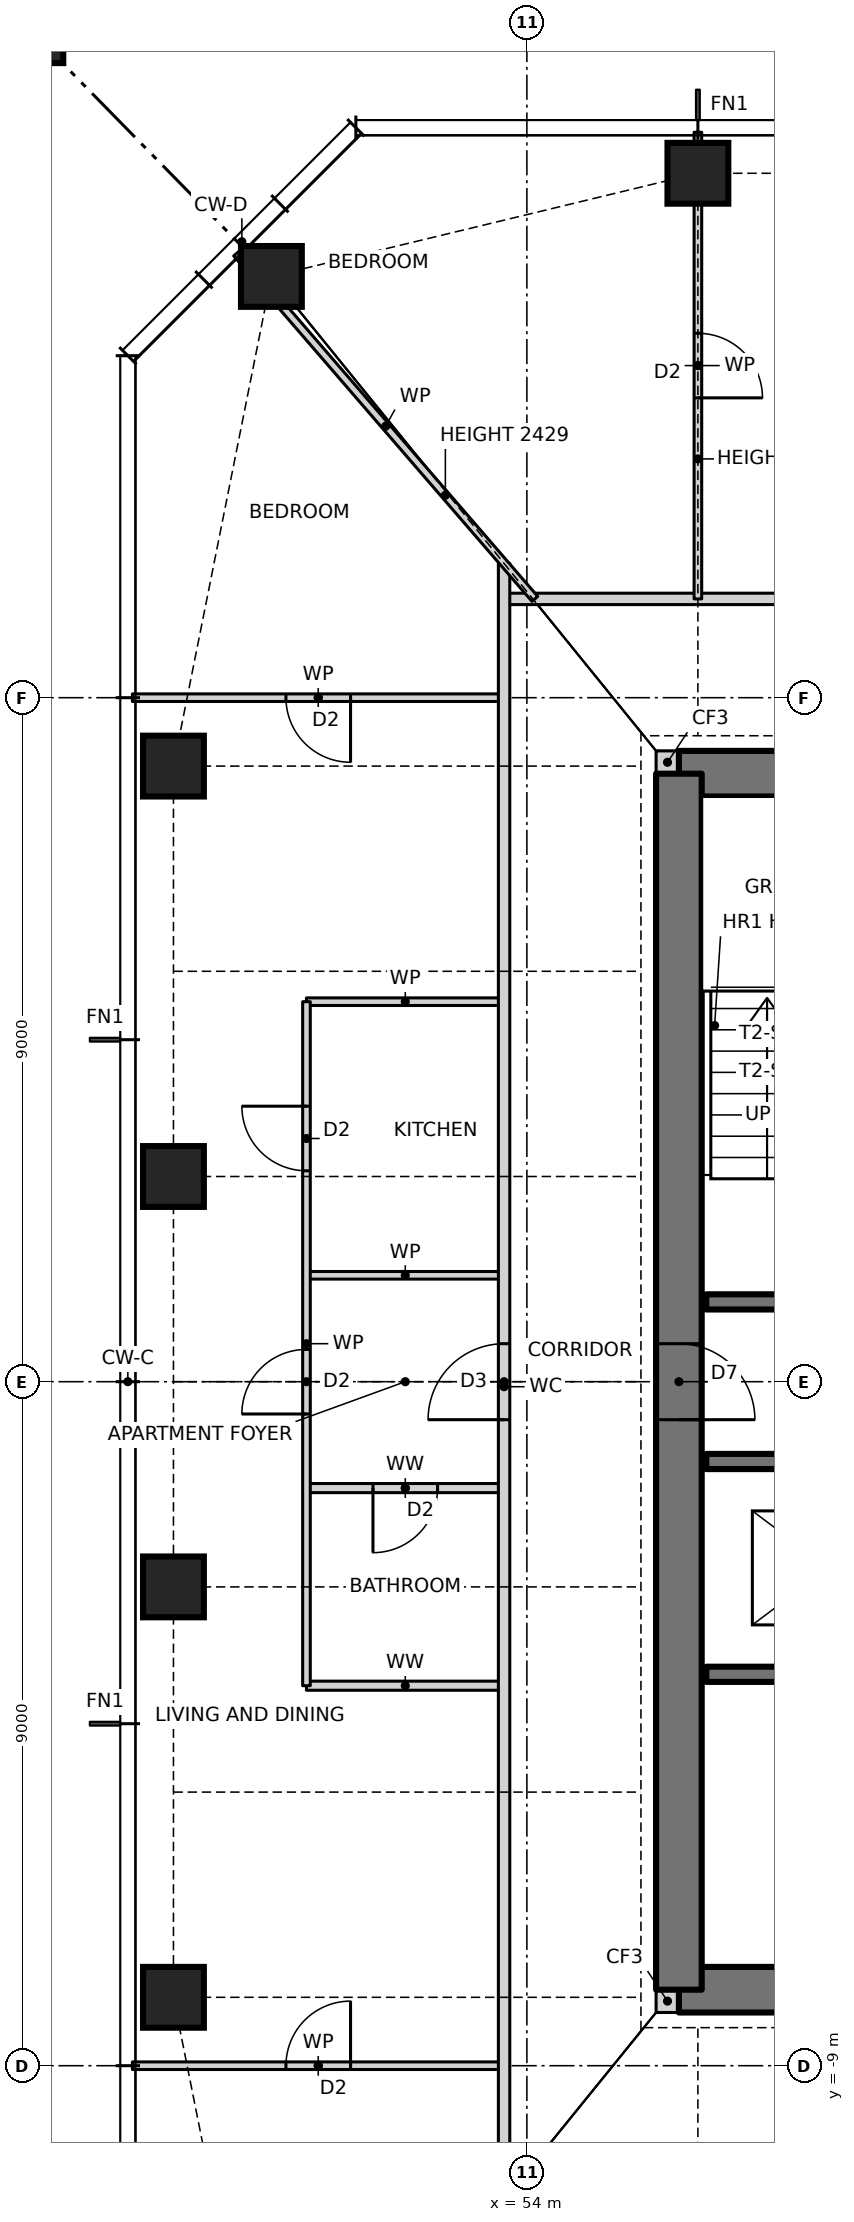
"""IFC4 building model, lengths in metres.
Left out: names, types, materials, properties, quantities, classifications, styles, units other than length and angle.
Written with IfcOpenShell. Run it as: python <this file> out.ifc"""

import sys

from ifc_helpers import new_model, si_unit, direction, frame, frame_2d, origin, origin_2d, place, context, subcontext, project, spatial, rectangle, hollow_rectangle, extrude, element, fill, save


model = new_model("IFC4")
c1 = context("Model", 3, precision=1e-05, world=origin(), true_north=direction((0.0, 1.0)))
c2 = subcontext(c1, "Body", "Model", "MODEL_VIEW")
j1 = project(units=[si_unit("LENGTHUNIT", "METRE"), si_unit("PLANEANGLEUNIT", "RADIAN")], contexts=[c1])
p1 = place(None, origin())
s1 = spatial("IfcSite", under=j1, at=p1, CompositionType="ELEMENT")
p2 = place(p1, origin())
s2 = spatial("IfcBuilding", under=s1, at=p2, CompositionType="ELEMENT")
p3 = place(p2, frame((0.0, 0.0, 122.5)))
s3 = spatial("IfcBuildingStorey", under=s2, at=p3, CompositionType="ELEMENT", Elevation=122.5)
for number, where, z_axis, x_axis in (
    (1, (56.25, 15.9, 0.0), (0.0, 0.0, 1.0), (1.0, 0.0, 0.0)),
    (2, (50.639, 14.543, 0.0), (0.0, 0.0, 1.0), (1.0, 0.0, 0.0)),
    (3, (49.35, 8.1, 0.0), (0.0, 0.0, 1.0), (1.0, 0.0, 0.0)),
    (4, (49.35, 2.7, 0.0), (0.0, 0.0, 1.0), (1.0, 0.0, 0.0)),
    (5, (49.35, -2.7, 0.0), (0.0, 0.0, 1.0), (1.0, 0.0, 0.0)),
    (6, (49.35, -8.1, 0.0), (0.0, 0.0, 1.0), (1.0, 0.0, 0.0)),
):
    element("IfcColumn", number, at=place(p3, frame(where, z_axis=z_axis, x_axis=x_axis)), inside=s3, PredefinedType="COLUMN", context=c2, shape_type="SweptSolid", body=[
        extrude(hollow_rectangle(XDim=0.8, YDim=0.8, WallThickness=0.1, at=origin_2d()), origin(), (0.0, 0.0, 1.0), 3.5),
    ])
p4 = place(p3, frame((47.35, 17.9, 0.0), z_axis=(0.0, 0.0, 1.0), x_axis=(1.0, 0.0, 0.0)))
e7 = element("IfcColumn", 7, at=p4, inside=s3, PredefinedType="COLUMN", context=c2, shape_type="SweptSolid", body=[
    extrude(hollow_rectangle(XDim=1.1, YDim=1.1, WallThickness=0.06, at=origin_2d()), origin(), (0.0, 0.0, 1.0), 3.5),
])
for number, where, z_axis, x_axis in (
    (8, (55.7, -8.15, 0.0), (0.0, 0.0, 1.0), (1.0, 0.0, 0.0)),
    (9, (55.7, 8.15, 0.0), (0.0, 0.0, 1.0), (1.0, 0.0, 0.0)),
):
    element("IfcWall", number, at=place(p3, frame(where, z_axis=z_axis, x_axis=x_axis)), inside=s3, PredefinedType="SOLIDWALL", context=c2, shape_type="SweptSolid", body=[
        extrude(rectangle(XDim=0.3, YDim=0.3, at=frame_2d((0.15, 0.0))), origin(), (0.0, 0.0, 1.0), 3.5),
    ])
p5 = place(p3, frame((56.0, -8.0, 0.0), z_axis=(0.0, 0.0, 1.0), x_axis=(1.0, 0.0, 0.0)))
e10 = element("IfcWall", 10, at=p5, inside=s3, PredefinedType="SHEAR", context=c2, shape_type="SweptSolid", body=[
    extrude(rectangle(XDim=14.0, YDim=0.6, at=frame_2d((7.0, 0.0))), origin(), (0.0, 0.0, 1.0), 3.5),
])
p6 = place(p5, frame((2.7, 0.0, 0.0)))
e11 = element("IfcOpeningElement", 11, at=p6, cuts=e10, PredefinedType="OPENING", context=c2, shape_type="SweptSolid", body=[
    extrude(rectangle(XDim=0.9, YDim=2.1, at=frame_2d((0.45, 1.05))), frame((0.0, 0.31, 0.0), z_axis=(0.0, -1.0, 0.0), x_axis=(1.0, 0.0, 0.0)), (0.0, 0.0, 1.0), 0.62),
])
p7 = place(p5, frame((7.7, 0.0, 0.0)))
e12 = element("IfcOpeningElement", 12, at=p7, cuts=e10, PredefinedType="OPENING", context=c2, shape_type="SweptSolid", body=[
    extrude(rectangle(XDim=0.9, YDim=2.1, at=frame_2d((0.45, 1.05))), frame((0.0, 0.31, 0.0), z_axis=(0.0, -1.0, 0.0), x_axis=(1.0, 0.0, 0.0)), (0.0, 0.0, 1.0), 0.62),
])
p8 = place(p3, frame((70.0, 8.0, 0.0), z_axis=(0.0, 0.0, 1.0), x_axis=(-1.0, 0.0, 0.0)))
e13 = element("IfcWall", 13, at=p8, inside=s3, PredefinedType="SHEAR", context=c2, shape_type="SweptSolid", body=[
    extrude(rectangle(XDim=14.0, YDim=0.6, at=frame_2d((7.0, 0.0))), origin(), (0.0, 0.0, 1.0), 3.5),
])
p9 = place(p8, frame((8.2, 0.0, 0.0)))
e14 = element("IfcOpeningElement", 14, at=p9, cuts=e13, PredefinedType="OPENING", context=c2, shape_type="SweptSolid", body=[
    extrude(rectangle(XDim=0.9, YDim=2.1, at=frame_2d((0.45, 1.05))), frame((0.0, 0.31, 0.0), z_axis=(0.0, -1.0, 0.0), x_axis=(1.0, 0.0, 0.0)), (0.0, 0.0, 1.0), 0.62),
])
p10 = place(p8, frame((3.2, 0.0, 0.0)))
e15 = element("IfcOpeningElement", 15, at=p10, cuts=e13, PredefinedType="OPENING", context=c2, shape_type="SweptSolid", body=[
    extrude(rectangle(XDim=0.9, YDim=2.1, at=frame_2d((0.45, 1.05))), frame((0.0, 0.31, 0.0), z_axis=(0.0, -1.0, 0.0), x_axis=(1.0, 0.0, 0.0)), (0.0, 0.0, 1.0), 0.62),
])
p11 = place(p3, frame((56.0, 8.0, 0.0), z_axis=(0.0, 0.0, 1.0), x_axis=(0.0, -1.0, 0.0)))
e16 = element("IfcWall", 16, at=p11, inside=s3, PredefinedType="SHEAR", context=c2, shape_type="SweptSolid", body=[
    extrude(rectangle(XDim=16.0, YDim=0.6, at=frame_2d((8.0, 0.0))), origin(), (0.0, 0.0, 1.0), 3.5),
])
p12 = place(p11, frame((7.5, 0.0, 0.0)))
e17 = element("IfcOpeningElement", 17, at=p12, cuts=e16, PredefinedType="OPENING", context=c2, shape_type="SweptSolid", body=[
    extrude(rectangle(XDim=1.0, YDim=2.1, at=frame_2d((0.5, 1.05))), frame((0.0, 0.31, 0.0), z_axis=(0.0, -1.0, 0.0), x_axis=(1.0, 0.0, 0.0)), (0.0, 0.0, 1.0), 0.62),
])
p13 = place(p3, frame((48.81, -9.0, 0.0), z_axis=(0.0, 0.0, 1.0), x_axis=(1.0, 0.0, 0.0)))
e18 = element("IfcWall", 18, at=p13, inside=s3, PredefinedType="PARTITIONING", context=c2, shape_type="SweptSolid", body=[
    extrude(rectangle(XDim=4.89, YDim=0.1, at=frame_2d((2.445, 0.0))), origin(), (0.0, 0.0, 1.0), 3.27),
])
p14 = place(p13, frame((2.02, 0.0, 0.0)))
e19 = element("IfcOpeningElement", 19, at=p14, cuts=e18, PredefinedType="OPENING", context=c2, shape_type="SweptSolid", body=[
    extrude(rectangle(XDim=0.85, YDim=2.1, at=frame_2d((0.425, 1.05))), frame((0.0, 0.06, 0.0), z_axis=(0.0, -1.0, 0.0), x_axis=(1.0, 0.0, 0.0)), (0.0, 0.0, 1.0), 0.12),
])
p15 = place(p3, frame((51.1, -4.0, 0.0), z_axis=(0.0, 0.0, 1.0), x_axis=(1.0, 0.0, 0.0)))
e20 = element("IfcWall", 20, at=p15, inside=s3, PredefinedType="PARTITIONING", context=c2, shape_type="SweptSolid", body=[
    extrude(rectangle(XDim=2.6, YDim=0.12, at=frame_2d((1.3, 0.0))), origin(), (0.0, 0.0, 1.0), 3.27),
])
p16 = place(p3, frame((56.36, -3.85, 0.0), z_axis=(0.0, 0.0, 1.0), x_axis=(1.0, 0.0, 0.0)))
e21 = element("IfcWall", 21, at=p16, inside=s3, PredefinedType="SOLIDWALL", context=c2, shape_type="SweptSolid", body=[
    extrude(rectangle(XDim=9.94, YDim=0.2, at=frame_2d((4.97, 0.0))), origin(), (0.0, 0.0, 1.0), 3.5),
])
p17 = place(p3, frame((51.1, -1.4, 0.0), z_axis=(0.0, 0.0, 1.0), x_axis=(1.0, 0.0, 0.0)))
e22 = element("IfcWall", 22, at=p17, inside=s3, PredefinedType="PARTITIONING", context=c2, shape_type="SweptSolid", body=[
    extrude(rectangle(XDim=2.6, YDim=0.12, at=frame_2d((1.3, 0.0))), origin(), (0.0, 0.0, 1.0), 3.27),
])
p18 = place(p17, frame((0.875, 0.0, 0.0)))
e23 = element("IfcOpeningElement", 23, at=p18, cuts=e22, PredefinedType="OPENING", context=c2, shape_type="SweptSolid", body=[
    extrude(rectangle(XDim=0.85, YDim=2.1, at=frame_2d((0.425, 1.05))), frame((0.0, 0.07, 0.0), z_axis=(0.0, -1.0, 0.0), x_axis=(1.0, 0.0, 0.0)), (0.0, 0.0, 1.0), 0.14),
])
p19 = place(p3, frame((56.36, -1.05, 0.0), z_axis=(0.0, 0.0, 1.0), x_axis=(1.0, 0.0, 0.0)))
e24 = element("IfcWall", 24, at=p19, inside=s3, PredefinedType="SOLIDWALL", context=c2, shape_type="SweptSolid", body=[
    extrude(rectangle(XDim=13.28, YDim=0.2, at=frame_2d((6.64, 0.0))), origin(), (0.0, 0.0, 1.0), 3.5),
])
p20 = place(p19, frame((11.11, 0.0, 0.0)))
e25 = element("IfcOpeningElement", 25, at=p20, cuts=e24, PredefinedType="OPENING", context=c2, shape_type="SweptSolid", body=[
    extrude(rectangle(XDim=1.0, YDim=2.1, at=frame_2d((0.5, 1.05))), frame((0.0, 0.11, 0.0), z_axis=(0.0, -1.0, 0.0), x_axis=(1.0, 0.0, 0.0)), (0.0, 0.0, 1.0), 0.22),
])
p21 = place(p19, frame((1.087, 0.0, 0.0)))
e26 = element("IfcOpeningElement", 26, at=p21, cuts=e24, PredefinedType="OPENING", context=c2, shape_type="SweptSolid", body=[
    extrude(rectangle(XDim=1.1, YDim=2.1, at=frame_2d((0.55, 1.05))), frame((0.0, 0.11, 0.0), z_axis=(0.0, -1.0, 0.0), x_axis=(1.0, 0.0, 0.0)), (0.0, 0.0, 1.0), 0.22),
])
p22 = place(p19, frame((4.39, 0.0, 0.0)))
e27 = element("IfcOpeningElement", 27, at=p22, cuts=e24, PredefinedType="OPENING", context=c2, shape_type="SweptSolid", body=[
    extrude(rectangle(XDim=1.1, YDim=2.1, at=frame_2d((0.55, 1.05))), frame((0.0, 0.11, 0.0), z_axis=(0.0, -1.0, 0.0), x_axis=(1.0, 0.0, 0.0)), (0.0, 0.0, 1.0), 0.22),
])
p23 = place(p19, frame((7.724, 0.0, 0.0)))
e28 = element("IfcOpeningElement", 28, at=p23, cuts=e24, PredefinedType="OPENING", context=c2, shape_type="SweptSolid", body=[
    extrude(rectangle(XDim=1.1, YDim=2.1, at=frame_2d((0.55, 1.05))), frame((0.0, 0.11, 0.0), z_axis=(0.0, -1.0, 0.0), x_axis=(1.0, 0.0, 0.0)), (0.0, 0.0, 1.0), 0.22),
])
p24 = place(p3, frame((56.36, 1.05, 0.0), z_axis=(0.0, 0.0, 1.0), x_axis=(1.0, 0.0, 0.0)))
e29 = element("IfcWall", 29, at=p24, inside=s3, PredefinedType="SOLIDWALL", context=c2, shape_type="SweptSolid", body=[
    extrude(rectangle(XDim=13.28, YDim=0.2, at=frame_2d((6.64, 0.0))), origin(), (0.0, 0.0, 1.0), 3.5),
])
p25 = place(p24, frame((1.17, 0.0, 0.0)))
e30 = element("IfcOpeningElement", 30, at=p25, cuts=e29, PredefinedType="OPENING", context=c2, shape_type="SweptSolid", body=[
    extrude(rectangle(XDim=1.0, YDim=2.1, at=frame_2d((0.5, 1.05))), frame((0.0, 0.11, 0.0), z_axis=(0.0, -1.0, 0.0), x_axis=(1.0, 0.0, 0.0)), (0.0, 0.0, 1.0), 0.22),
])
p26 = place(p24, frame((5.14, 0.0, 0.0)))
e31 = element("IfcOpeningElement", 31, at=p26, cuts=e29, PredefinedType="OPENING", context=c2, shape_type="SweptSolid", body=[
    extrude(rectangle(XDim=0.9, YDim=2.1, at=frame_2d((0.45, 1.05))), frame((0.0, 0.11, 0.0), z_axis=(0.0, -1.0, 0.0), x_axis=(1.0, 0.0, 0.0)), (0.0, 0.0, 1.0), 0.22),
])
p27 = place(p24, frame((8.44, 0.0, 0.0)))
e32 = element("IfcOpeningElement", 32, at=p27, cuts=e29, PredefinedType="OPENING", context=c2, shape_type="SweptSolid", body=[
    extrude(rectangle(XDim=0.9, YDim=2.1, at=frame_2d((0.45, 1.05))), frame((0.0, 0.11, 0.0), z_axis=(0.0, -1.0, 0.0), x_axis=(1.0, 0.0, 0.0)), (0.0, 0.0, 1.0), 0.22),
])
p28 = place(p24, frame((10.96, 0.0, 0.0)))
e33 = element("IfcOpeningElement", 33, at=p28, cuts=e29, PredefinedType="OPENING", context=c2, shape_type="SweptSolid", body=[
    extrude(rectangle(XDim=1.3, YDim=2.1, at=frame_2d((0.65, 1.05))), frame((0.0, 0.11, 0.0), z_axis=(0.0, -1.0, 0.0), x_axis=(1.0, 0.0, 0.0)), (0.0, 0.0, 1.0), 0.22),
])
for number, where, z_axis, x_axis in (
    (34, (51.1, 1.4, 0.0), (0.0, 0.0, 1.0), (1.0, 0.0, 0.0)),
    (35, (51.1, 5.0, 0.0), (0.0, 0.0, 1.0), (1.0, 0.0, 0.0)),
):
    element("IfcWall", number, at=place(p3, frame(where, z_axis=z_axis, x_axis=x_axis)), inside=s3, PredefinedType="PARTITIONING", context=c2, shape_type="SweptSolid", body=[
        extrude(rectangle(XDim=2.6, YDim=0.1, at=frame_2d((1.3, 0.0))), origin(), (0.0, 0.0, 1.0), 3.27),
    ])
p29 = place(p3, frame((48.81, 9.0, 0.0), z_axis=(0.0, 0.0, 1.0), x_axis=(1.0, 0.0, 0.0)))
e36 = element("IfcWall", 36, at=p29, inside=s3, PredefinedType="PARTITIONING", context=c2, shape_type="SweptSolid", body=[
    extrude(rectangle(XDim=4.89, YDim=0.1, at=frame_2d((2.445, 0.0))), origin(), (0.0, 0.0, 1.0), 3.27),
])
p30 = place(p29, frame((2.02, 0.0, 0.0)))
e37 = element("IfcOpeningElement", 37, at=p30, cuts=e36, PredefinedType="OPENING", context=c2, shape_type="SweptSolid", body=[
    extrude(rectangle(XDim=0.85, YDim=2.1, at=frame_2d((0.425, 1.05))), frame((0.0, 0.06, 0.0), z_axis=(0.0, -1.0, 0.0), x_axis=(1.0, 0.0, 0.0)), (0.0, 0.0, 1.0), 0.12),
])
p31 = place(p3, frame((53.7, 10.3, 0.0), z_axis=(0.0, 0.0, 1.0), x_axis=(1.0, 0.0, 0.0)))
e38 = element("IfcWall", 38, at=p31, inside=s3, PredefinedType="PARTITIONING", context=c2, shape_type="SweptSolid", body=[
    extrude(rectangle(XDim=18.6, YDim=0.15, at=frame_2d((9.3, 0.0))), origin(), (0.0, 0.0, 1.0), 3.27),
])
p32 = place(p31, frame((8.8, 0.0, 0.0)))
e39 = element("IfcOpeningElement", 39, at=p32, cuts=e38, PredefinedType="OPENING", context=c2, shape_type="SweptSolid", body=[
    extrude(rectangle(XDim=1.0, YDim=2.1, at=frame_2d((0.5, 1.05))), frame((0.0, 0.085, 0.0), z_axis=(0.0, -1.0, 0.0), x_axis=(1.0, 0.0, 0.0)), (0.0, 0.0, 1.0), 0.17),
])
p33 = place(p3, frame((56.25, 10.3, 0.0), z_axis=(0.0, 0.0, 1.0), x_axis=(0.0, 1.0, 0.0)))
e40 = element("IfcWall", 40, at=p33, inside=s3, PredefinedType="PARTITIONING", context=c2, shape_type="SweptSolid", body=[
    extrude(rectangle(XDim=6.14, YDim=0.1, at=frame_2d((3.07, 0.0))), origin(), (0.0, 0.0, 1.0), 2.587),
])
p34 = place(p33, frame((2.645, 0.0, 0.0)))
e41 = element("IfcOpeningElement", 41, at=p34, cuts=e40, PredefinedType="OPENING", context=c2, shape_type="SweptSolid", body=[
    extrude(rectangle(XDim=0.85, YDim=2.1, at=frame_2d((0.425, 1.05))), frame((0.0, 0.06, 0.0), z_axis=(0.0, -1.0, 0.0), x_axis=(1.0, 0.0, 0.0)), (0.0, 0.0, 1.0), 0.12),
])
p35 = place(p3, frame((53.7, -10.9, 0.0), z_axis=(0.0, 0.0, 1.0), x_axis=(0.0, 1.0, 0.0)))
e42 = element("IfcWall", 42, at=p35, inside=s3, PredefinedType="PARTITIONING", context=c2, shape_type="SweptSolid", body=[
    extrude(rectangle(XDim=21.668, YDim=0.15, at=frame_2d((10.834, 0.0))), origin(), (0.0, 0.0, 1.0), 3.27),
])
p36 = place(p35, frame((10.4, 0.0, 0.0)))
e43 = element("IfcOpeningElement", 43, at=p36, cuts=e42, PredefinedType="OPENING", context=c2, shape_type="SweptSolid", body=[
    extrude(rectangle(XDim=1.0, YDim=2.1, at=frame_2d((0.5, 1.05))), frame((0.0, 0.085, 0.0), z_axis=(0.0, -1.0, 0.0), x_axis=(1.0, 0.0, 0.0)), (0.0, 0.0, 1.0), 0.17),
])
p37 = place(p3, frame((51.1, -4.0, 0.0), z_axis=(0.0, 0.0, 1.0), x_axis=(0.0, 1.0, 0.0)))
e44 = element("IfcWall", 44, at=p37, inside=s3, PredefinedType="PARTITIONING", context=c2, shape_type="SweptSolid", body=[
    extrude(rectangle(XDim=9.0, YDim=0.1, at=frame_2d((4.5, 0.0))), origin(), (0.0, 0.0, 1.0), 3.27),
])
p38 = place(p37, frame((6.775, 0.0, 0.0)))
e45 = element("IfcOpeningElement", 45, at=p38, cuts=e44, PredefinedType="OPENING", context=c2, shape_type="SweptSolid", body=[
    extrude(rectangle(XDim=0.85, YDim=2.1, at=frame_2d((0.425, 1.05))), frame((0.0, 0.06, 0.0), z_axis=(0.0, -1.0, 0.0), x_axis=(1.0, 0.0, 0.0)), (0.0, 0.0, 1.0), 0.12),
])
p39 = place(p37, frame((3.575, 0.0, 0.0)))
e46 = element("IfcOpeningElement", 46, at=p39, cuts=e44, PredefinedType="OPENING", context=c2, shape_type="SweptSolid", body=[
    extrude(rectangle(XDim=0.85, YDim=2.1, at=frame_2d((0.425, 1.05))), frame((0.0, 0.06, 0.0), z_axis=(0.0, -1.0, 0.0), x_axis=(1.0, 0.0, 0.0)), (0.0, 0.0, 1.0), 0.12),
])
p40 = place(p3, frame((54.105, 10.3, 0.0), z_axis=(0.0, 0.0, 1.0), x_axis=(-0.653606109319, 0.756834892074, 0.0)))
e47 = element("IfcWall", 47, at=p40, inside=s3, PredefinedType="PARTITIONING", context=c2, shape_type="SweptSolid", body=[
    extrude(rectangle(XDim=6.005, YDim=0.1, at=frame_2d((3.002, 0.0))), origin(), (0.0, 0.0, 1.0), 2.429),
])
p41 = place(p34, frame((0.85, 0.0, 0.0), z_axis=(0.0, 0.0, 1.0), x_axis=(-1.0, 0.0, 0.0)))
e48 = element("IfcDoor", 48, at=p41, inside=s3, OperationType="SINGLE_SWING_RIGHT", PredefinedType="DOOR", context=c2, shape_type="SweptSolid", body=[
    extrude(rectangle(XDim=0.85, YDim=2.1, at=frame_2d((0.425, 1.05))), frame((0.0, 0.025, 0.0), z_axis=(0.0, -1.0, 0.0), x_axis=(1.0, 0.0, 0.0)), (0.0, 0.0, 1.0), 0.05),
])
fill(e41, e48)
p42 = place(p38, origin())
e49 = element("IfcDoor", 49, at=p42, inside=s3, OperationType="SINGLE_SWING_RIGHT", PredefinedType="DOOR", context=c2, shape_type="SweptSolid", body=[
    extrude(rectangle(XDim=0.85, YDim=2.1, at=frame_2d((0.425, 1.05))), frame((0.0, 0.025, 0.0), z_axis=(0.0, -1.0, 0.0), x_axis=(1.0, 0.0, 0.0)), (0.0, 0.0, 1.0), 0.05),
])
fill(e45, e49)
p43 = place(p36, origin())
e50 = element("IfcDoor", 50, at=p43, inside=s3, OperationType="SINGLE_SWING_LEFT", PredefinedType="DOOR", context=c2, shape_type="SweptSolid", body=[
    extrude(rectangle(XDim=1.0, YDim=2.1, at=frame_2d((0.5, 1.05))), frame((0.0, 0.025, 0.0), z_axis=(0.0, -1.0, 0.0), x_axis=(1.0, 0.0, 0.0)), (0.0, 0.0, 1.0), 0.05),
])
fill(e43, e50)
p44 = place(p39, origin())
e51 = element("IfcDoor", 51, at=p44, inside=s3, OperationType="SINGLE_SWING_LEFT", PredefinedType="DOOR", context=c2, shape_type="SweptSolid", body=[
    extrude(rectangle(XDim=0.85, YDim=2.1, at=frame_2d((0.425, 1.05))), frame((0.0, 0.025, 0.0), z_axis=(0.0, -1.0, 0.0), x_axis=(1.0, 0.0, 0.0)), (0.0, 0.0, 1.0), 0.05),
])
fill(e46, e51)
p45 = place(p18, frame((0.85, 0.0, 0.0), z_axis=(0.0, 0.0, 1.0), x_axis=(-1.0, 0.0, 0.0)))
e52 = element("IfcDoor", 52, at=p45, inside=s3, OperationType="SINGLE_SWING_RIGHT", PredefinedType="DOOR", context=c2, shape_type="SweptSolid", body=[
    extrude(rectangle(XDim=0.85, YDim=2.1, at=frame_2d((0.425, 1.05))), frame((0.0, 0.025, 0.0), z_axis=(0.0, -1.0, 0.0), x_axis=(1.0, 0.0, 0.0)), (0.0, 0.0, 1.0), 0.05),
])
fill(e23, e52)
p46 = place(p30, frame((0.85, 0.0, 0.0), z_axis=(0.0, 0.0, 1.0), x_axis=(-1.0, 0.0, 0.0)))
e53 = element("IfcDoor", 53, at=p46, inside=s3, OperationType="SINGLE_SWING_LEFT", PredefinedType="DOOR", context=c2, shape_type="SweptSolid", body=[
    extrude(rectangle(XDim=0.85, YDim=2.1, at=frame_2d((0.425, 1.05))), frame((0.0, 0.025, 0.0), z_axis=(0.0, -1.0, 0.0), x_axis=(1.0, 0.0, 0.0)), (0.0, 0.0, 1.0), 0.05),
])
fill(e37, e53)
p47 = place(p14, origin())
e54 = element("IfcDoor", 54, at=p47, inside=s3, OperationType="SINGLE_SWING_RIGHT", PredefinedType="DOOR", context=c2, shape_type="SweptSolid", body=[
    extrude(rectangle(XDim=0.85, YDim=2.1, at=frame_2d((0.425, 1.05))), frame((0.0, 0.025, 0.0), z_axis=(0.0, -1.0, 0.0), x_axis=(1.0, 0.0, 0.0)), (0.0, 0.0, 1.0), 0.05),
])
fill(e19, e54)
p48 = place(p12, origin())
e55 = element("IfcDoor", 55, at=p48, inside=s3, OperationType="SINGLE_SWING_RIGHT", PredefinedType="DOOR", context=c2, shape_type="SweptSolid", body=[
    extrude(rectangle(XDim=1.0, YDim=2.1, at=frame_2d((0.5, 1.05))), frame((0.0, 0.025, 0.0), z_axis=(0.0, -1.0, 0.0), x_axis=(1.0, 0.0, 0.0)), (0.0, 0.0, 1.0), 0.05),
])
fill(e17, e55)
save(model, sys.argv[1])
